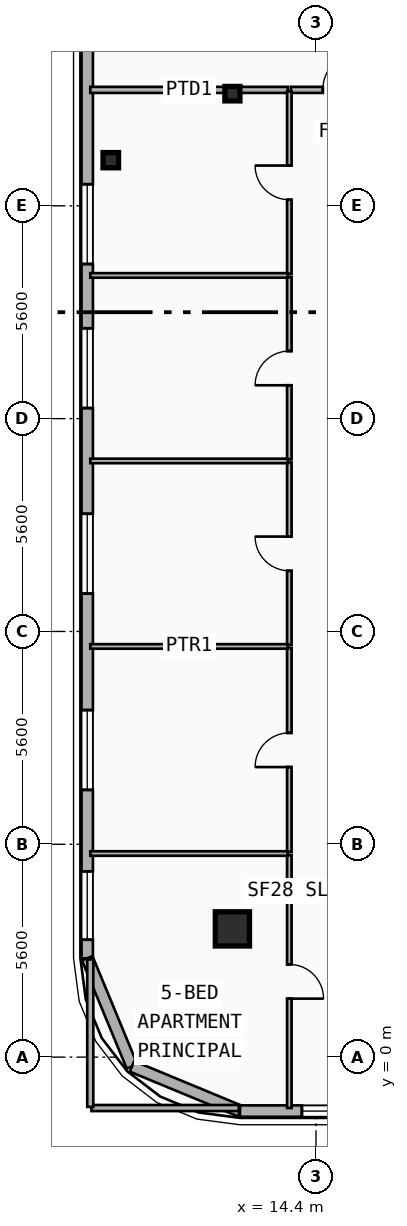
"""IFC4 building model, lengths in metres.
Left out: names, types, materials, properties, quantities, classifications, styles, units other than length and angle.
Written with IfcOpenShell. Run it as: python <this file> out.ifc"""

import sys

from ifc_helpers import new_model, si_unit, direction, frame, frame_2d, origin, origin_2d, place, context, subcontext, project, spatial, rectangle, i_section, extrude, element, fill, save


model = new_model("IFC4")
c1 = context("Model", 3, precision=1e-05, world=origin(), true_north=direction((0.0, 1.0)))
c2 = subcontext(c1, "Body", "Model", "MODEL_VIEW")
j1 = project(units=[si_unit("LENGTHUNIT", "METRE"), si_unit("PLANEANGLEUNIT", "RADIAN")], contexts=[c1])
p1 = place(None, origin())
s1 = spatial("IfcSite", under=j1, at=p1, CompositionType="ELEMENT")
p2 = place(p1, origin())
s2 = spatial("IfcBuilding", under=s1, at=p2, CompositionType="ELEMENT")
p3 = place(p2, frame((0.0, 0.0, 251.0)))
s3 = spatial("IfcBuildingStorey", under=s2, at=p3, CompositionType="ELEMENT", Elevation=251.0)
p4 = place(p3, frame((12.2, 25.35, 0.0), z_axis=(0.0, 0.0, 1.0), x_axis=(1.0, 0.0, 0.0)))
e1 = element("IfcColumn", 1, at=p4, inside=s3, PredefinedType="COLUMN", context=c2, shape_type="SweptSolid", body=[
    extrude(i_section(OverallWidth=0.395, OverallDepth=0.38, WebThickness=0.019, FlangeThickness=0.03, FilletRadius=0.015, at=origin_2d()), origin(), (0.0, 0.0, 1.0), 3.7),
])
p5 = place(p3, frame((12.2, 3.482, 0.0), z_axis=(0.0, -0.090227632116, 0.995921168769), x_axis=(1.0, 0.0, 0.0)))
e2 = element("IfcColumn", 2, at=p5, inside=s3, PredefinedType="COLUMN", context=c2, shape_type="SweptSolid", body=[
    extrude(rectangle(XDim=0.9, YDim=0.9, at=origin_2d()), origin(), (0.0, 0.0, 1.0), 3.715),
])
p6 = place(p3, frame((9.0, 23.6, 0.0), z_axis=(0.0, 0.0, 1.0), x_axis=(1.0, 0.0, 0.0)))
e3 = element("IfcColumn", 3, at=p6, inside=s3, PredefinedType="COLUMN", context=c2, shape_type="SweptSolid", body=[
    extrude(i_section(OverallWidth=0.408, OverallDepth=0.4, WebThickness=0.025, FlangeThickness=0.039, FilletRadius=0.015, at=origin_2d()), origin(), (0.0, 0.0, 1.0), 3.7),
])
p7 = place(p3, frame((8.38, 2.6, 0.0), z_axis=(0.0, 0.0, 1.0), x_axis=(0.0, 1.0, 0.0)))
e4 = element("IfcWall", 4, at=p7, inside=s3, PredefinedType="SOLIDWALL", context=c2, shape_type="SweptSolid", body=[
    extrude(rectangle(XDim=34.2, YDim=0.3, at=frame_2d((17.1, 0.0))), origin(), (0.0, 0.0, 1.0), 3.42),
])
p8 = place(p7, frame((0.489, 0.0, 0.8)))
e5 = element("IfcOpeningElement", 5, at=p8, cuts=e4, PredefinedType="OPENING", context=c2, shape_type="SweptSolid", body=[
    extrude(rectangle(XDim=1.8, YDim=1.8, at=frame_2d((0.9, 0.9))), frame((0.0, 0.16, 0.0), z_axis=(0.0, -1.0, 0.0), x_axis=(1.0, 0.0, 0.0)), (0.0, 0.0, 1.0), 0.32),
])
p9 = place(p7, frame((4.431, 0.0, 0.75)))
e6 = element("IfcOpeningElement", 6, at=p9, cuts=e4, PredefinedType="OPENING", context=c2, shape_type="SweptSolid", body=[
    extrude(rectangle(XDim=2.1, YDim=2.1, at=frame_2d((1.05, 1.05))), frame((0.0, 0.16, 0.0), z_axis=(0.0, -1.0, 0.0), x_axis=(1.0, 0.0, 0.0)), (0.0, 0.0, 1.0), 0.32),
])
p10 = place(p7, frame((9.596, 0.0, 0.75)))
e7 = element("IfcOpeningElement", 7, at=p10, cuts=e4, PredefinedType="OPENING", context=c2, shape_type="SweptSolid", body=[
    extrude(rectangle(XDim=2.1, YDim=2.1, at=frame_2d((1.05, 1.05))), frame((0.0, 0.16, 0.0), z_axis=(0.0, -1.0, 0.0), x_axis=(1.0, 0.0, 0.0)), (0.0, 0.0, 1.0), 0.32),
])
p11 = place(p7, frame((14.478, 0.0, 0.75)))
e8 = element("IfcOpeningElement", 8, at=p11, cuts=e4, PredefinedType="OPENING", context=c2, shape_type="SweptSolid", body=[
    extrude(rectangle(XDim=2.1, YDim=2.1, at=frame_2d((1.05, 1.05))), frame((0.0, 0.16, 0.0), z_axis=(0.0, -1.0, 0.0), x_axis=(1.0, 0.0, 0.0)), (0.0, 0.0, 1.0), 0.32),
])
p12 = place(p7, frame((18.268, 0.0, 0.75)))
e9 = element("IfcOpeningElement", 9, at=p12, cuts=e4, PredefinedType="OPENING", context=c2, shape_type="SweptSolid", body=[
    extrude(rectangle(XDim=2.1, YDim=2.1, at=frame_2d((1.05, 1.05))), frame((0.0, 0.16, 0.0), z_axis=(0.0, -1.0, 0.0), x_axis=(1.0, 0.0, 0.0)), (0.0, 0.0, 1.0), 0.32),
])
p13 = place(p3, frame((9.557, -0.243, 0.0), z_axis=(0.0, 0.0, 1.0), x_axis=(-0.382676475685, 0.923882414032, 0.0)))
e10 = element("IfcWall", 10, at=p13, inside=s3, PredefinedType="SOLIDWALL", context=c2, shape_type="SweptSolid", body=[
    extrude(rectangle(XDim=3.077, YDim=0.3, at=frame_2d((1.539, 0.0))), origin(), (0.0, 0.0, 1.0), 3.42),
])
p14 = place(p3, frame((12.4, -1.42, 0.0), z_axis=(0.0, 0.0, 1.0), x_axis=(-0.92389884758, 0.382636798336, 0.0)))
e11 = element("IfcWall", 11, at=p14, inside=s3, PredefinedType="SOLIDWALL", context=c2, shape_type="SweptSolid", body=[
    extrude(rectangle(XDim=3.077, YDim=0.3, at=frame_2d((1.538, 0.0))), origin(), (0.0, 0.0, 1.0), 3.42),
])
p15 = place(p3, frame((45.2, -1.42, 0.0), z_axis=(0.0, 0.0, 1.0), x_axis=(-1.0, 0.0, 0.0)))
e12 = element("IfcWall", 12, at=p15, inside=s3, PredefinedType="SOLIDWALL", context=c2, shape_type="SweptSolid", body=[
    extrude(rectangle(XDim=32.8, YDim=0.3, at=frame_2d((16.4, 0.0))), origin(), (0.0, 0.0, 1.0), 3.42),
])
p16 = place(p15, frame((29.071, 0.0, 0.75)))
e13 = element("IfcOpeningElement", 13, at=p16, cuts=e12, PredefinedType="OPENING", context=c2, shape_type="SweptSolid", body=[
    extrude(rectangle(XDim=2.1, YDim=2.1, at=frame_2d((1.05, 1.05))), frame((0.0, 0.16, 0.0), z_axis=(0.0, -1.0, 0.0), x_axis=(1.0, 0.0, 0.0)), (0.0, 0.0, 1.0), 0.32),
])
p17 = place(p15, frame((26.745, 0.0, 0.75)))
e14 = element("IfcOpeningElement", 14, at=p17, cuts=e12, PredefinedType="OPENING", context=c2, shape_type="SweptSolid", body=[
    extrude(rectangle(XDim=1.6, YDim=1.95, at=frame_2d((0.8, 0.975))), frame((0.0, 0.16, 0.0), z_axis=(0.0, -1.0, 0.0), x_axis=(1.0, 0.0, 0.0)), (0.0, 0.0, 1.0), 0.32),
])
p18 = place(p15, frame((18.105, 0.0, 0.75)))
e15 = element("IfcOpeningElement", 15, at=p18, cuts=e12, PredefinedType="OPENING", context=c2, shape_type="SweptSolid", body=[
    extrude(rectangle(XDim=2.1, YDim=2.1, at=frame_2d((1.05, 1.05))), frame((0.0, 0.16, 0.0), z_axis=(0.0, -1.0, 0.0), x_axis=(1.0, 0.0, 0.0)), (0.0, 0.0, 1.0), 0.32),
])
p19 = place(p15, frame((21.762, 0.0, 0.75)))
e16 = element("IfcOpeningElement", 16, at=p19, cuts=e12, PredefinedType="OPENING", context=c2, shape_type="SweptSolid", body=[
    extrude(rectangle(XDim=2.1, YDim=2.1, at=frame_2d((1.05, 1.05))), frame((0.0, 0.16, 0.0), z_axis=(0.0, -1.0, 0.0), x_axis=(1.0, 0.0, 0.0)), (0.0, 0.0, 1.0), 0.32),
])
p20 = place(p15, frame((11.364, 0.0, 0.75)))
e17 = element("IfcOpeningElement", 17, at=p20, cuts=e12, PredefinedType="OPENING", context=c2, shape_type="SweptSolid", body=[
    extrude(rectangle(XDim=2.1, YDim=2.1, at=frame_2d((1.05, 1.05))), frame((0.0, 0.16, 0.0), z_axis=(0.0, -1.0, 0.0), x_axis=(1.0, 0.0, 0.0)), (0.0, 0.0, 1.0), 0.32),
])
p21 = place(p15, frame((9.238, 0.0, 0.68)))
e18 = element("IfcOpeningElement", 18, at=p21, cuts=e12, PredefinedType="OPENING", context=c2, shape_type="SweptSolid", body=[
    extrude(rectangle(XDim=1.2, YDim=1.5, at=frame_2d((0.6, 0.75))), frame((0.0, 0.16, 0.0), z_axis=(0.0, -1.0, 0.0), x_axis=(1.0, 0.0, 0.0)), (0.0, 0.0, 1.0), 0.32),
])
p22 = place(p15, frame((14.669, 0.0, 0.75)))
e19 = element("IfcOpeningElement", 19, at=p22, cuts=e12, PredefinedType="OPENING", context=c2, shape_type="SweptSolid", body=[
    extrude(rectangle(XDim=2.1, YDim=2.1, at=frame_2d((1.05, 1.05))), frame((0.0, 0.16, 0.0), z_axis=(0.0, -1.0, 0.0), x_axis=(1.0, 0.0, 0.0)), (0.0, 0.0, 1.0), 0.32),
])
p23 = place(p15, frame((1.937, 0.0, 0.75)))
e20 = element("IfcOpeningElement", 20, at=p23, cuts=e12, PredefinedType="OPENING", context=c2, shape_type="SweptSolid", body=[
    extrude(rectangle(XDim=2.1, YDim=2.1, at=frame_2d((1.05, 1.05))), frame((0.0, 0.16, 0.0), z_axis=(0.0, -1.0, 0.0), x_axis=(1.0, 0.0, 0.0)), (0.0, 0.0, 1.0), 0.32),
])
p24 = place(p15, frame((4.709, 0.0, 0.8)))
e21 = element("IfcOpeningElement", 21, at=p24, cuts=e12, PredefinedType="OPENING", context=c2, shape_type="SweptSolid", body=[
    extrude(rectangle(XDim=1.8, YDim=1.8, at=frame_2d((0.9, 0.9))), frame((0.0, 0.16, 0.0), z_axis=(0.0, -1.0, 0.0), x_axis=(1.0, 0.0, 0.0)), (0.0, 0.0, 1.0), 0.32),
])
p25 = place(p3, frame((13.738, 25.45, 0.0), z_axis=(0.0, 0.0, 1.0), x_axis=(1.0, 0.0, 0.0)))
e22 = element("IfcWall", 22, at=p25, inside=s3, PredefinedType="PARTITIONING", context=c2, shape_type="SweptSolid", body=[
    extrude(rectangle(XDim=2.682, YDim=0.16, at=frame_2d((1.341, 0.0))), origin(), (0.0, 0.0, 1.0), 3.42),
])
p26 = place(p25, frame((0.841, 0.0, 0.0)))
e23 = element("IfcOpeningElement", 23, at=p26, cuts=e22, PredefinedType="OPENING", context=c2, shape_type="SweptSolid", body=[
    extrude(rectangle(XDim=1.0, YDim=2.15, at=frame_2d((0.5, 1.075))), frame((0.0, 0.09, 0.0), z_axis=(0.0, -1.0, 0.0), x_axis=(1.0, 0.0, 0.0)), (0.0, 0.0, 1.0), 0.18),
])
p27 = place(p3, frame((8.46, 25.45, 0.0), z_axis=(0.0, 0.0, 1.0), x_axis=(1.0, 0.0, 0.0)))
e24 = element("IfcWall", 24, at=p27, inside=s3, PredefinedType="PARTITIONING", context=c2, shape_type="SweptSolid", body=[
    extrude(rectangle(XDim=5.198, YDim=0.16, at=frame_2d((2.599, 0.0))), origin(), (0.0, 0.0, 1.0), 2.7),
])
p28 = place(p3, frame((13.698, 5.317, 0.0), z_axis=(0.0, 0.0, 1.0), x_axis=(0.0, -1.0, 0.0)))
e25 = element("IfcWall", 25, at=p28, inside=s3, PredefinedType="PARTITIONING", context=c2, shape_type="SweptSolid", body=[
    extrude(rectangle(XDim=6.657, YDim=0.12, at=frame_2d((3.329, 0.0))), origin(), (0.0, 0.0, 1.0), 3.08),
])
p29 = place(p28, frame((2.878, 0.0, 0.0)))
e26 = element("IfcOpeningElement", 26, at=p29, cuts=e25, PredefinedType="OPENING", context=c2, shape_type="SweptSolid", body=[
    extrude(rectangle(XDim=0.9, YDim=2.1, at=frame_2d((0.45, 1.05))), frame((0.0, 0.07, 0.0), z_axis=(0.0, -1.0, 0.0), x_axis=(1.0, 0.0, 0.0)), (0.0, 0.0, 1.0), 0.14),
])
p30 = place(p3, frame((13.698, 5.397, 0.0), z_axis=(0.0, 0.0, 1.0), x_axis=(0.0, 1.0, 0.0)))
e27 = element("IfcWall", 27, at=p30, inside=s3, PredefinedType="PARTITIONING", context=c2, shape_type="SweptSolid", body=[
    extrude(rectangle(XDim=5.369, YDim=0.12, at=frame_2d((2.685, 0.0))), origin(), (0.0, 0.0, 1.0), 2.9),
])
p31 = place(p30, frame((2.235, 0.0, 0.0)))
e28 = element("IfcOpeningElement", 28, at=p31, cuts=e27, PredefinedType="OPENING", context=c2, shape_type="SweptSolid", body=[
    extrude(rectangle(XDim=0.9, YDim=2.1, at=frame_2d((0.45, 1.05))), frame((0.0, 0.07, 0.0), z_axis=(0.0, -1.0, 0.0), x_axis=(1.0, 0.0, 0.0)), (0.0, 0.0, 1.0), 0.14),
])
p32 = place(p3, frame((13.698, 10.846, 0.0), z_axis=(0.0, 0.0, 1.0), x_axis=(0.0, 1.0, 0.0)))
e29 = element("IfcWall", 29, at=p32, inside=s3, PredefinedType="PARTITIONING", context=c2, shape_type="SweptSolid", body=[
    extrude(rectangle(XDim=4.801, YDim=0.12, at=frame_2d((2.4, 0.0))), origin(), (0.0, 0.0, 1.0), 2.9),
])
p33 = place(p32, frame((1.95, 0.0, 0.0)))
e30 = element("IfcOpeningElement", 30, at=p33, cuts=e29, PredefinedType="OPENING", context=c2, shape_type="SweptSolid", body=[
    extrude(rectangle(XDim=0.9, YDim=2.1, at=frame_2d((0.45, 1.05))), frame((0.0, 0.07, 0.0), z_axis=(0.0, -1.0, 0.0), x_axis=(1.0, 0.0, 0.0)), (0.0, 0.0, 1.0), 0.14),
])
p34 = place(p3, frame((13.698, 15.727, 0.0), z_axis=(0.0, 0.0, 1.0), x_axis=(0.0, 1.0, 0.0)))
e31 = element("IfcWall", 31, at=p34, inside=s3, PredefinedType="PARTITIONING", context=c2, shape_type="SweptSolid", body=[
    extrude(rectangle(XDim=4.801, YDim=0.12, at=frame_2d((2.4, 0.0))), origin(), (0.0, 0.0, 1.0), 2.9),
])
p35 = place(p34, frame((1.95, 0.0, 0.0)))
e32 = element("IfcOpeningElement", 32, at=p35, cuts=e31, PredefinedType="OPENING", context=c2, shape_type="SweptSolid", body=[
    extrude(rectangle(XDim=0.9, YDim=2.1, at=frame_2d((0.45, 1.05))), frame((0.0, 0.07, 0.0), z_axis=(0.0, -1.0, 0.0), x_axis=(1.0, 0.0, 0.0)), (0.0, 0.0, 1.0), 0.14),
])
p36 = place(p3, frame((13.698, 20.608, 0.0), z_axis=(0.0, 0.0, 1.0), x_axis=(0.0, 1.0, 0.0)))
e33 = element("IfcWall", 33, at=p36, inside=s3, PredefinedType="PARTITIONING", context=c2, shape_type="SweptSolid", body=[
    extrude(rectangle(XDim=4.802, YDim=0.12, at=frame_2d((2.401, 0.0))), origin(), (0.0, 0.0, 1.0), 3.05),
])
p37 = place(p36, frame((1.951, 0.0, 0.0)))
e34 = element("IfcOpeningElement", 34, at=p37, cuts=e33, PredefinedType="OPENING", context=c2, shape_type="SweptSolid", body=[
    extrude(rectangle(XDim=0.9, YDim=2.1, at=frame_2d((0.45, 1.05))), frame((0.0, 0.07, 0.0), z_axis=(0.0, -1.0, 0.0), x_axis=(1.0, 0.0, 0.0)), (0.0, 0.0, 1.0), 0.14),
])
for number, where, z_axis, x_axis in (
    (35, (8.46, 5.357, 0.0), (0.0, 0.0, 1.0), (1.0, 0.0, 0.0)),
    (36, (8.46, 10.806, 0.0), (0.0, 0.0, 1.0), (1.0, 0.0, 0.0)),
    (37, (8.46, 15.687, 0.0), (0.0, 0.0, 1.0), (1.0, 0.0, 0.0)),
    (38, (8.46, 20.568, 0.0), (0.0, 0.0, 1.0), (1.0, 0.0, 0.0)),
):
    element("IfcWall", number, at=place(p3, frame(where, z_axis=z_axis, x_axis=x_axis)), inside=s3, PredefinedType="PARTITIONING", context=c2, shape_type="SweptSolid", body=[
        extrude(rectangle(XDim=5.198, YDim=0.12, at=frame_2d((2.599, 0.0))), origin(), (0.0, 0.0, 1.0), 2.7),
    ])
for number, where, z_axis, x_axis in (
    (39, (8.49, -1.34, 0.0), (0.0, 0.0, 1.0), (1.0, 0.0, 0.0)),
    (40, (8.46, -1.31, 0.0), (0.0, 0.0, 1.0), (0.0, 1.0, 0.0)),
):
    element("IfcWall", number, at=place(p3, frame(where, z_axis=z_axis, x_axis=x_axis)), inside=s3, PredefinedType="PARTITIONING", context=c2, shape_type="SweptSolid", body=[
        extrude(rectangle(XDim=3.88, YDim=0.16, at=frame_2d((1.94, 0.0))), origin(), (0.0, 0.0, 1.0), 3.42),
    ])
p38 = place(p8, origin())
e41 = element("IfcWindow", 41, at=p38, inside=s3, PartitioningType="SINGLE_PANEL", PredefinedType="WINDOW", context=c2, shape_type="SweptSolid", body=[
    extrude(rectangle(XDim=1.8, YDim=1.8, at=frame_2d((0.9, 0.9))), frame((0.0, 0.03, 0.0), z_axis=(0.0, -1.0, 0.0), x_axis=(1.0, 0.0, 0.0)), (0.0, 0.0, 1.0), 0.06),
])
fill(e5, e41)
p39 = place(p9, origin())
e42 = element("IfcWindow", 42, at=p39, inside=s3, PartitioningType="SINGLE_PANEL", PredefinedType="WINDOW", context=c2, shape_type="SweptSolid", body=[
    extrude(rectangle(XDim=2.1, YDim=2.1, at=frame_2d((1.05, 1.05))), frame((0.0, 0.03, 0.0), z_axis=(0.0, -1.0, 0.0), x_axis=(1.0, 0.0, 0.0)), (0.0, 0.0, 1.0), 0.06),
])
fill(e6, e42)
p40 = place(p10, origin())
e43 = element("IfcWindow", 43, at=p40, inside=s3, PartitioningType="SINGLE_PANEL", PredefinedType="WINDOW", context=c2, shape_type="SweptSolid", body=[
    extrude(rectangle(XDim=2.1, YDim=2.1, at=frame_2d((1.05, 1.05))), frame((0.0, 0.03, 0.0), z_axis=(0.0, -1.0, 0.0), x_axis=(1.0, 0.0, 0.0)), (0.0, 0.0, 1.0), 0.06),
])
fill(e7, e43)
p41 = place(p11, origin())
e44 = element("IfcWindow", 44, at=p41, inside=s3, PartitioningType="SINGLE_PANEL", PredefinedType="WINDOW", context=c2, shape_type="SweptSolid", body=[
    extrude(rectangle(XDim=2.1, YDim=2.1, at=frame_2d((1.05, 1.05))), frame((0.0, 0.03, 0.0), z_axis=(0.0, -1.0, 0.0), x_axis=(1.0, 0.0, 0.0)), (0.0, 0.0, 1.0), 0.06),
])
fill(e8, e44)
p42 = place(p12, origin())
e45 = element("IfcWindow", 45, at=p42, inside=s3, PartitioningType="SINGLE_PANEL", PredefinedType="WINDOW", context=c2, shape_type="SweptSolid", body=[
    extrude(rectangle(XDim=2.1, YDim=2.1, at=frame_2d((1.05, 1.05))), frame((0.0, 0.03, 0.0), z_axis=(0.0, -1.0, 0.0), x_axis=(1.0, 0.0, 0.0)), (0.0, 0.0, 1.0), 0.06),
])
fill(e9, e45)
p43 = place(p16, origin())
e46 = element("IfcWindow", 46, at=p43, inside=s3, PartitioningType="SINGLE_PANEL", PredefinedType="WINDOW", context=c2, shape_type="SweptSolid", body=[
    extrude(rectangle(XDim=2.1, YDim=2.1, at=frame_2d((1.05, 1.05))), frame((0.0, 0.03, 0.0), z_axis=(0.0, -1.0, 0.0), x_axis=(1.0, 0.0, 0.0)), (0.0, 0.0, 1.0), 0.06),
])
fill(e13, e46)
p44 = place(p26, origin())
e47 = element("IfcDoor", 47, at=p44, inside=s3, OperationType="SINGLE_SWING_RIGHT", PredefinedType="DOOR", context=c2, shape_type="SweptSolid", body=[
    extrude(rectangle(XDim=1.0, YDim=2.15, at=frame_2d((0.5, 1.075))), frame((0.0, 0.025, 0.0), z_axis=(0.0, -1.0, 0.0), x_axis=(1.0, 0.0, 0.0)), (0.0, 0.0, 1.0), 0.05),
])
fill(e23, e47)
p45 = place(p29, origin())
e48 = element("IfcDoor", 48, at=p45, inside=s3, OperationType="SINGLE_SWING_RIGHT", PredefinedType="DOOR", context=c2, shape_type="SweptSolid", body=[
    extrude(rectangle(XDim=0.9, YDim=2.1, at=frame_2d((0.45, 1.05))), frame((0.0, 0.025, 0.0), z_axis=(0.0, -1.0, 0.0), x_axis=(1.0, 0.0, 0.0)), (0.0, 0.0, 1.0), 0.05),
])
fill(e26, e48)
p46 = place(p31, origin())
e49 = element("IfcDoor", 49, at=p46, inside=s3, OperationType="SINGLE_SWING_LEFT", PredefinedType="DOOR", context=c2, shape_type="SweptSolid", body=[
    extrude(rectangle(XDim=0.9, YDim=2.1, at=frame_2d((0.45, 1.05))), frame((0.0, 0.025, 0.0), z_axis=(0.0, -1.0, 0.0), x_axis=(1.0, 0.0, 0.0)), (0.0, 0.0, 1.0), 0.05),
])
fill(e28, e49)
p47 = place(p33, origin())
e50 = element("IfcDoor", 50, at=p47, inside=s3, OperationType="SINGLE_SWING_RIGHT", PredefinedType="DOOR", context=c2, shape_type="SweptSolid", body=[
    extrude(rectangle(XDim=0.9, YDim=2.1, at=frame_2d((0.45, 1.05))), frame((0.0, 0.025, 0.0), z_axis=(0.0, -1.0, 0.0), x_axis=(1.0, 0.0, 0.0)), (0.0, 0.0, 1.0), 0.05),
])
fill(e30, e50)
p48 = place(p35, origin())
e51 = element("IfcDoor", 51, at=p48, inside=s3, OperationType="SINGLE_SWING_LEFT", PredefinedType="DOOR", context=c2, shape_type="SweptSolid", body=[
    extrude(rectangle(XDim=0.9, YDim=2.1, at=frame_2d((0.45, 1.05))), frame((0.0, 0.025, 0.0), z_axis=(0.0, -1.0, 0.0), x_axis=(1.0, 0.0, 0.0)), (0.0, 0.0, 1.0), 0.05),
])
fill(e32, e51)
p49 = place(p37, origin())
e52 = element("IfcDoor", 52, at=p49, inside=s3, OperationType="SINGLE_SWING_RIGHT", PredefinedType="DOOR", context=c2, shape_type="SweptSolid", body=[
    extrude(rectangle(XDim=0.9, YDim=2.1, at=frame_2d((0.45, 1.05))), frame((0.0, 0.025, 0.0), z_axis=(0.0, -1.0, 0.0), x_axis=(1.0, 0.0, 0.0)), (0.0, 0.0, 1.0), 0.05),
])
fill(e34, e52)
save(model, sys.argv[1])
